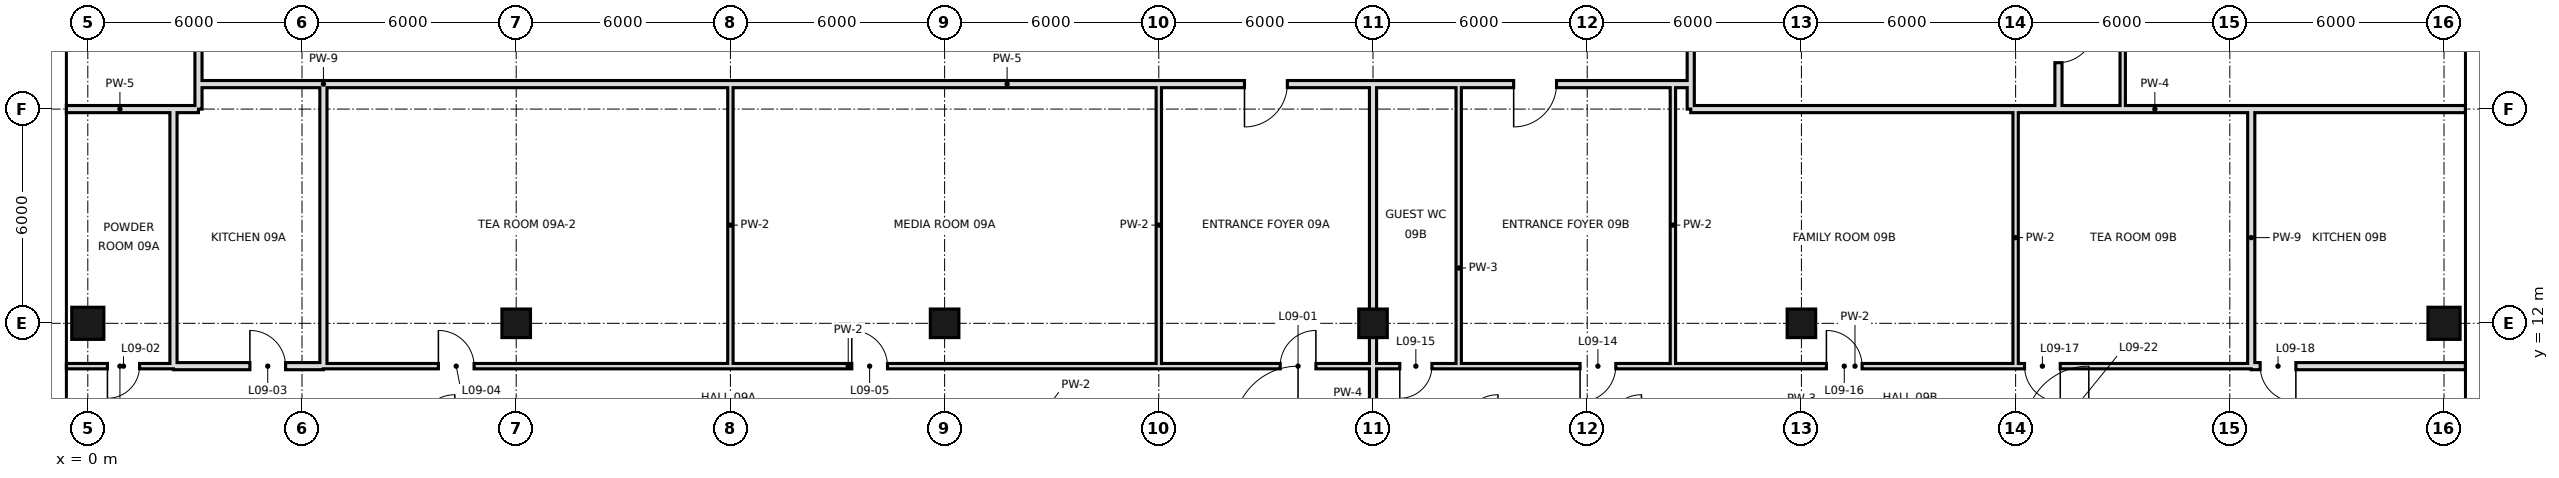
"""IFC4 building model, lengths in metres.
Left out: names, types, materials, properties, quantities, classifications, styles, units other than length and angle.
Written with IfcOpenShell. Run it as: python <this file> out.ifc"""

import sys

from ifc_helpers import new_model, si_unit, direction, frame, frame_2d, origin, origin_2d, place, context, subcontext, project, spatial, rectangle, hollow_rectangle, extrude, element, fill, save


model = new_model("IFC4")
c1 = context("Model", 3, precision=1e-05, world=origin(), true_north=direction((0.0, 1.0)))
c2 = subcontext(c1, "Body", "Model", "MODEL_VIEW")
j1 = project(units=[si_unit("LENGTHUNIT", "METRE"), si_unit("PLANEANGLEUNIT", "RADIAN")], contexts=[c1])
p1 = place(None, origin())
s1 = spatial("IfcSite", under=j1, at=p1, CompositionType="ELEMENT")
p2 = place(p1, origin())
s2 = spatial("IfcBuilding", under=s1, at=p2, CompositionType="ELEMENT")
p3 = place(p2, frame((0.0, 0.0, 53.4)))
s3 = spatial("IfcBuildingStorey", under=s2, at=p3, CompositionType="ELEMENT", Elevation=53.4)
p4 = place(p3, frame((0.0, 12.0, 0.0), z_axis=(0.0, 0.0, 1.0), x_axis=(1.0, 0.0, 0.0)))
e1 = element("IfcColumn", 1, at=p4, inside=s3, PredefinedType="COLUMN", context=c2, shape_type="SweptSolid", body=[
    extrude(hollow_rectangle(XDim=0.9, YDim=0.9, WallThickness=0.045, at=origin_2d()), origin(), (0.0, 0.0, 1.0), 3.6),
])
for number, where, z_axis, x_axis in (
    (2, (12.0, 12.0, 0.0), (0.0, 0.0, 1.0), (1.0, 0.0, 0.0)),
    (3, (24.0, 12.0, 0.0), (0.0, 0.0, 1.0), (1.0, 0.0, 0.0)),
    (4, (36.0, 12.0, 0.0), (0.0, 0.0, 1.0), (1.0, 0.0, 0.0)),
    (5, (48.0, 12.0, 0.0), (0.0, 0.0, 1.0), (1.0, 0.0, 0.0)),
):
    element("IfcColumn", number, at=place(p3, frame(where, z_axis=z_axis, x_axis=x_axis)), inside=s3, PredefinedType="COLUMN", context=c2, shape_type="SweptSolid", body=[
        extrude(hollow_rectangle(XDim=0.8, YDim=0.8, WallThickness=0.04, at=origin_2d()), origin(), (0.0, 0.0, 1.0), 3.6),
    ])
p5 = place(p3, frame((66.0, 12.0, 0.0), z_axis=(0.0, 0.0, 1.0), x_axis=(1.0, 0.0, 0.0)))
e6 = element("IfcColumn", 6, at=p5, inside=s3, PredefinedType="COLUMN", context=c2, shape_type="SweptSolid", body=[
    extrude(hollow_rectangle(XDim=0.9, YDim=0.9, WallThickness=0.045, at=origin_2d()), origin(), (0.0, 0.0, 1.0), 3.6),
])
p6 = place(p3, frame((18.0, 10.8, 0.0), z_axis=(0.0, 0.0, 1.0), x_axis=(0.0, 1.0, 0.0)))
e7 = element("IfcWall", 7, at=p6, inside=s3, PredefinedType="PARTITIONING", context=c2, shape_type="SweptSolid", body=[
    extrude(rectangle(XDim=7.9, YDim=0.15, at=frame_2d((3.95, 0.0))), origin(), (0.0, 0.0, 1.0), 2.72),
])
p7 = place(p3, frame((2.4, 10.8, 0.0), z_axis=(0.0, 0.0, 1.0), x_axis=(0.0, 1.0, 0.0)))
e8 = element("IfcWall", 8, at=p7, inside=s3, PredefinedType="SOLIDWALL", context=c2, shape_type="SweptSolid", body=[
    extrude(rectangle(XDim=7.2, YDim=0.2, at=frame_2d((3.6, 0.0))), origin(), (0.0, 0.0, 1.0), 2.72),
])
p8 = place(p3, frame((3.1, 18.7, 0.0), z_axis=(0.0, 0.0, 1.0), x_axis=(0.0, 1.0, 0.0)))
e9 = element("IfcWall", 9, at=p8, inside=s3, PredefinedType="SOLIDWALL", context=c2, shape_type="SweptSolid", body=[
    extrude(rectangle(XDim=27.249, YDim=0.2, at=frame_2d((13.625, 0.0))), origin(), (0.0, 0.0, 1.0), 2.97),
])
p9 = place(p8, frame((17.54, 0.0, 0.0)))
e10 = element("IfcOpeningElement", 10, at=p9, cuts=e9, PredefinedType="OPENING", context=c2, shape_type="SweptSolid", body=[
    extrude(rectangle(XDim=1.2, YDim=2.4, at=frame_2d((0.6, 1.2))), frame((0.0, 0.11, 0.0), z_axis=(0.0, -1.0, 0.0), x_axis=(1.0, 0.0, 0.0)), (0.0, 0.0, 1.0), 0.22),
])
p10 = place(p3, frame((3.1, 18.0, 0.0), z_axis=(0.0, 0.0, 1.0), x_axis=(0.0, 1.0, 0.0)))
e11 = element("IfcWall", 11, at=p10, inside=s3, PredefinedType="SOLIDWALL", context=c2, shape_type="SweptSolid", body=[
    extrude(rectangle(XDim=0.7, YDim=0.2, at=frame_2d((0.35, 0.0))), origin(), (0.0, 0.0, 1.0), 2.97),
])
p11 = place(p3, frame((30.0, 10.8, 0.0), z_axis=(0.0, 0.0, 1.0), x_axis=(0.0, 1.0, 0.0)))
e12 = element("IfcWall", 12, at=p11, inside=s3, PredefinedType="PARTITIONING", context=c2, shape_type="SweptSolid", body=[
    extrude(rectangle(XDim=7.9, YDim=0.15, at=frame_2d((3.95, 0.0))), origin(), (0.0, 0.0, 1.0), 2.72),
])
p12 = place(p3, frame((36.0, 0.0, 0.0), z_axis=(0.0, 0.0, 1.0), x_axis=(0.0, 1.0, 0.0)))
e13 = element("IfcWall", 13, at=p12, inside=s3, PredefinedType="SOLIDWALL", context=c2, shape_type="SweptSolid", body=[
    extrude(rectangle(XDim=18.7, YDim=0.2, at=frame_2d((9.35, 0.0))), origin(), (0.0, 0.0, 1.0), 2.72),
])
for number, where, z_axis, x_axis in (
    (14, (38.4, 10.8, 0.0), (0.0, 0.0, 1.0), (0.0, 1.0, 0.0)),
    (15, (44.4, 10.8, 0.0), (0.0, 0.0, 1.0), (0.0, 1.0, 0.0)),
):
    element("IfcWall", number, at=place(p3, frame(where, z_axis=z_axis, x_axis=x_axis)), inside=s3, PredefinedType="PARTITIONING", context=c2, shape_type="SweptSolid", body=[
        extrude(rectangle(XDim=7.9, YDim=0.15, at=frame_2d((3.95, 0.0))), origin(), (0.0, 0.0, 1.0), 3.42),
    ])
p13 = place(p3, frame((44.9, 18.0, 0.0), z_axis=(0.0, 0.0, 1.0), x_axis=(0.0, 1.0, 0.0)))
e16 = element("IfcWall", 16, at=p13, inside=s3, PredefinedType="SOLIDWALL", context=c2, shape_type="SweptSolid", body=[
    extrude(rectangle(XDim=3.6, YDim=0.2, at=frame_2d((1.8, 0.0))), origin(), (0.0, 0.0, 1.0), 2.97),
])
p14 = place(p3, frame((54.0, 10.8, 0.0), z_axis=(0.0, 0.0, 1.0), x_axis=(0.0, 1.0, 0.0)))
e17 = element("IfcWall", 17, at=p14, inside=s3, PredefinedType="PARTITIONING", context=c2, shape_type="SweptSolid", body=[
    extrude(rectangle(XDim=7.2, YDim=0.15, at=frame_2d((3.6, 0.0))), origin(), (0.0, 0.0, 1.0), 3.42),
])
p15 = place(p3, frame((55.2, 18.0, 0.0), z_axis=(0.0, 0.0, 1.0), x_axis=(0.0, 1.0, 0.0)))
e18 = element("IfcWall", 18, at=p15, inside=s3, PredefinedType="SOLIDWALL", context=c2, shape_type="SweptSolid", body=[
    extrude(rectangle(XDim=3.6, YDim=0.2, at=frame_2d((1.8, 0.0))), origin(), (0.0, 0.0, 1.0), 2.52),
])
p16 = place(p15, frame((1.3, 0.0, 0.0)))
e19 = element("IfcOpeningElement", 19, at=p16, cuts=e18, PredefinedType="OPENING", context=c2, shape_type="SweptSolid", body=[
    extrude(rectangle(XDim=1.0, YDim=2.4, at=frame_2d((0.5, 1.2))), frame((0.0, 0.11, 0.0), z_axis=(0.0, -1.0, 0.0), x_axis=(1.0, 0.0, 0.0)), (0.0, 0.0, 1.0), 0.22),
])
p17 = place(p3, frame((57.0, 18.0, 0.0), z_axis=(0.0, 0.0, 1.0), x_axis=(0.0, 1.0, 0.0)))
e20 = element("IfcWall", 20, at=p17, inside=s3, PredefinedType="PARTITIONING", context=c2, shape_type="SweptSolid", body=[
    extrude(rectangle(XDim=6.0, YDim=0.15, at=frame_2d((3.0, 0.0))), origin(), (0.0, 0.0, 1.0), 3.42),
])
p18 = place(p17, frame((3.4, 0.0, 0.0)))
e21 = element("IfcOpeningElement", 21, at=p18, cuts=e20, PredefinedType="OPENING", context=c2, shape_type="SweptSolid", body=[
    extrude(rectangle(XDim=1.0, YDim=2.4, at=frame_2d((0.5, 1.2))), frame((0.0, 0.085, 0.0), z_axis=(0.0, -1.0, 0.0), x_axis=(1.0, 0.0, 0.0)), (0.0, 0.0, 1.0), 0.17),
])
p19 = place(p3, frame((6.6, 10.8, 0.0), z_axis=(0.0, 0.0, 1.0), x_axis=(0.0, 1.0, 0.0)))
e22 = element("IfcWall", 22, at=p19, inside=s3, PredefinedType="SOLIDWALL", context=c2, shape_type="SweptSolid", body=[
    extrude(rectangle(XDim=7.9, YDim=0.2, at=frame_2d((3.95, 0.0))), origin(), (0.0, 0.0, 1.0), 2.72),
])
p20 = place(p3, frame((60.6, 10.8, 0.0), z_axis=(0.0, 0.0, 1.0), x_axis=(0.0, 1.0, 0.0)))
e23 = element("IfcWall", 23, at=p20, inside=s3, PredefinedType="SOLIDWALL", context=c2, shape_type="SweptSolid", body=[
    extrude(rectangle(XDim=7.2, YDim=0.2, at=frame_2d((3.6, 0.0))), origin(), (0.0, 0.0, 1.0), 2.52),
])
p21 = place(p3, frame((2.4, 10.8, 0.0), z_axis=(0.0, 0.0, 1.0), x_axis=(1.0, 0.0, 0.0)))
e24 = element("IfcWall", 24, at=p21, inside=s3, PredefinedType="SOLIDWALL", context=c2, shape_type="SweptSolid", body=[
    extrude(rectangle(XDim=4.2, YDim=0.2, at=frame_2d((2.1, 0.0))), origin(), (0.0, 0.0, 1.0), 2.72),
])
p22 = place(p21, frame((2.14, 0.0, 0.0)))
e25 = element("IfcOpeningElement", 25, at=p22, cuts=e24, PredefinedType="OPENING", context=c2, shape_type="SweptSolid", body=[
    extrude(rectangle(XDim=1.0, YDim=2.4, at=frame_2d((0.5, 1.2))), frame((0.0, 0.11, 0.0), z_axis=(0.0, -1.0, 0.0), x_axis=(1.0, 0.0, 0.0)), (0.0, 0.0, 1.0), 0.22),
])
p23 = place(p3, frame((60.6, 10.8, 0.0), z_axis=(0.0, 0.0, 1.0), x_axis=(1.0, 0.0, 0.0)))
e26 = element("IfcWall", 26, at=p23, inside=s3, PredefinedType="SOLIDWALL", context=c2, shape_type="SweptSolid", body=[
    extrude(rectangle(XDim=6.0, YDim=0.2, at=frame_2d((3.0, 0.0))), origin(), (0.0, 0.0, 1.0), 2.97),
])
p24 = place(p23, frame((0.25, 0.0, 0.0)))
e27 = element("IfcOpeningElement", 27, at=p24, cuts=e26, PredefinedType="OPENING", context=c2, shape_type="SweptSolid", body=[
    extrude(rectangle(XDim=1.0, YDim=2.4, at=frame_2d((0.5, 1.2))), frame((0.0, 0.11, 0.0), z_axis=(0.0, -1.0, 0.0), x_axis=(1.0, 0.0, 0.0)), (0.0, 0.0, 1.0), 0.22),
])
p25 = place(p3, frame((6.6, 10.8, 0.0), z_axis=(0.0, 0.0, 1.0), x_axis=(1.0, 0.0, 0.0)))
e28 = element("IfcWall", 28, at=p25, inside=s3, PredefinedType="PARTITIONING", context=c2, shape_type="SweptSolid", body=[
    extrude(rectangle(XDim=29.4, YDim=0.15, at=frame_2d((14.7, 0.0))), origin(), (0.0, 0.0, 1.0), 3.42),
])
p26 = place(p25, frame((26.8, 0.0, 0.0)))
e29 = element("IfcOpeningElement", 29, at=p26, cuts=e28, PredefinedType="OPENING", context=c2, shape_type="SweptSolid", body=[
    extrude(rectangle(XDim=1.0, YDim=2.4, at=frame_2d((0.5, 1.2))), frame((0.0, 0.085, 0.0), z_axis=(0.0, -1.0, 0.0), x_axis=(1.0, 0.0, 0.0)), (0.0, 0.0, 1.0), 0.17),
])
p27 = place(p25, frame((3.22, 0.0, 0.0)))
e30 = element("IfcOpeningElement", 30, at=p27, cuts=e28, PredefinedType="OPENING", context=c2, shape_type="SweptSolid", body=[
    extrude(rectangle(XDim=1.0, YDim=2.4, at=frame_2d((0.5, 1.2))), frame((0.0, 0.085, 0.0), z_axis=(0.0, -1.0, 0.0), x_axis=(1.0, 0.0, 0.0)), (0.0, 0.0, 1.0), 0.17),
])
p28 = place(p25, frame((14.8, 0.0, 0.0)))
e31 = element("IfcOpeningElement", 31, at=p28, cuts=e28, PredefinedType="OPENING", context=c2, shape_type="SweptSolid", body=[
    extrude(rectangle(XDim=1.0, YDim=2.4, at=frame_2d((0.5, 1.2))), frame((0.0, 0.085, 0.0), z_axis=(0.0, -1.0, 0.0), x_axis=(1.0, 0.0, 0.0)), (0.0, 0.0, 1.0), 0.17),
])
p29 = place(p3, frame((38.4, 10.8, 0.0), z_axis=(0.0, 0.0, 1.0), x_axis=(1.0, 0.0, 0.0)))
e32 = element("IfcWall", 32, at=p29, inside=s3, PredefinedType="PARTITIONING", context=c2, shape_type="SweptSolid", body=[
    extrude(rectangle(XDim=22.2, YDim=0.15, at=frame_2d((11.1, 0.0))), origin(), (0.0, 0.0, 1.0), 3.42),
])
p30 = place(p29, frame((3.4, 0.0, 0.0)))
e33 = element("IfcOpeningElement", 33, at=p30, cuts=e32, PredefinedType="OPENING", context=c2, shape_type="SweptSolid", body=[
    extrude(rectangle(XDim=1.0, YDim=2.4, at=frame_2d((0.5, 1.2))), frame((0.0, 0.085, 0.0), z_axis=(0.0, -1.0, 0.0), x_axis=(1.0, 0.0, 0.0)), (0.0, 0.0, 1.0), 0.17),
])
p31 = place(p29, frame((10.3, 0.0, 0.0)))
e34 = element("IfcOpeningElement", 34, at=p31, cuts=e32, PredefinedType="OPENING", context=c2, shape_type="SweptSolid", body=[
    extrude(rectangle(XDim=1.0, YDim=2.4, at=frame_2d((0.5, 1.2))), frame((0.0, 0.085, 0.0), z_axis=(0.0, -1.0, 0.0), x_axis=(1.0, 0.0, 0.0)), (0.0, 0.0, 1.0), 0.17),
])
p32 = place(p29, frame((15.85, 0.0, 0.0)))
e35 = element("IfcOpeningElement", 35, at=p32, cuts=e32, PredefinedType="OPENING", context=c2, shape_type="SweptSolid", body=[
    extrude(rectangle(XDim=1.0, YDim=2.4, at=frame_2d((0.5, 1.2))), frame((0.0, 0.085, 0.0), z_axis=(0.0, -1.0, 0.0), x_axis=(1.0, 0.0, 0.0)), (0.0, 0.0, 1.0), 0.17),
])
p33 = place(p3, frame((-0.6, 10.8, 0.0), z_axis=(0.0, 0.0, 1.0), x_axis=(1.0, 0.0, 0.0)))
e36 = element("IfcWall", 36, at=p33, inside=s3, PredefinedType="PARTITIONING", context=c2, shape_type="SweptSolid", body=[
    extrude(rectangle(XDim=3.0, YDim=0.15, at=frame_2d((1.5, 0.0))), origin(), (0.0, 0.0, 1.0), 3.42),
])
p34 = place(p33, frame((1.15, 0.0, 0.0)))
e37 = element("IfcOpeningElement", 37, at=p34, cuts=e36, PredefinedType="OPENING", context=c2, shape_type="SweptSolid", body=[
    extrude(rectangle(XDim=0.9, YDim=2.4, at=frame_2d((0.45, 1.2))), frame((0.0, 0.085, 0.0), z_axis=(0.0, -1.0, 0.0), x_axis=(1.0, 0.0, 0.0)), (0.0, 0.0, 1.0), 0.17),
])
p35 = place(p3, frame((36.0, 10.8, 0.0), z_axis=(0.0, 0.0, 1.0), x_axis=(1.0, 0.0, 0.0)))
e38 = element("IfcWall", 38, at=p35, inside=s3, PredefinedType="PARTITIONING", context=c2, shape_type="SweptSolid", body=[
    extrude(rectangle(XDim=2.4, YDim=0.15, at=frame_2d((1.2, 0.0))), origin(), (0.0, 0.0, 1.0), 3.42),
])
p36 = place(p35, frame((0.75, 0.0, 0.0)))
e39 = element("IfcOpeningElement", 39, at=p36, cuts=e38, PredefinedType="OPENING", context=c2, shape_type="SweptSolid", body=[
    extrude(rectangle(XDim=0.9, YDim=2.4, at=frame_2d((0.45, 1.2))), frame((0.0, 0.085, 0.0), z_axis=(0.0, -1.0, 0.0), x_axis=(1.0, 0.0, 0.0)), (0.0, 0.0, 1.0), 0.17),
])
p37 = place(p3, frame((-0.6, 18.0, 0.0), z_axis=(0.0, 0.0, 1.0), x_axis=(1.0, 0.0, 0.0)))
e40 = element("IfcWall", 40, at=p37, inside=s3, PredefinedType="SOLIDWALL", context=c2, shape_type="SweptSolid", body=[
    extrude(rectangle(XDim=3.0, YDim=0.2, at=frame_2d((1.5, 0.0))), origin(), (0.0, 0.0, 1.0), 2.72),
])
p38 = place(p3, frame((2.4, 18.0, 0.0), z_axis=(0.0, 0.0, 1.0), x_axis=(1.0, 0.0, 0.0)))
e41 = element("IfcWall", 41, at=p38, inside=s3, PredefinedType="SOLIDWALL", context=c2, shape_type="SweptSolid", body=[
    extrude(rectangle(XDim=0.7, YDim=0.2, at=frame_2d((0.35, 0.0))), origin(), (0.0, 0.0, 1.0), 2.97),
])
p39 = place(p3, frame((44.9, 18.0, 0.0), z_axis=(0.0, 0.0, 1.0), x_axis=(1.0, 0.0, 0.0)))
e42 = element("IfcWall", 42, at=p39, inside=s3, PredefinedType="SOLIDWALL", context=c2, shape_type="SweptSolid", body=[
    extrude(rectangle(XDim=10.3, YDim=0.2, at=frame_2d((5.15, 0.0))), origin(), (0.0, 0.0, 1.0), 2.52),
])
p40 = place(p3, frame((60.6, 18.0, 0.0), z_axis=(0.0, 0.0, 1.0), x_axis=(1.0, 0.0, 0.0)))
e43 = element("IfcWall", 43, at=p40, inside=s3, PredefinedType="SOLIDWALL", context=c2, shape_type="SweptSolid", body=[
    extrude(rectangle(XDim=6.0, YDim=0.2, at=frame_2d((3.0, 0.0))), origin(), (0.0, 0.0, 1.0), 2.52),
])
p41 = place(p3, frame((55.2, 18.0, 0.0), z_axis=(0.0, 0.0, 1.0), x_axis=(1.0, 0.0, 0.0)))
e44 = element("IfcWall", 44, at=p41, inside=s3, PredefinedType="SOLIDWALL", context=c2, shape_type="SweptSolid", body=[
    extrude(rectangle(XDim=5.4, YDim=0.2, at=frame_2d((2.7, 0.0))), origin(), (0.0, 0.0, 1.0), 2.52),
])
p42 = place(p3, frame((6.6, 18.7, 0.0), z_axis=(0.0, 0.0, 1.0), x_axis=(1.0, 0.0, 0.0)))
e45 = element("IfcWall", 45, at=p42, inside=s3, PredefinedType="SOLIDWALL", context=c2, shape_type="SweptSolid", body=[
    extrude(rectangle(XDim=38.3, YDim=0.2, at=frame_2d((19.15, 0.0))), origin(), (0.0, 0.0, 1.0), 2.72),
])
p43 = place(p42, frame((25.8, 0.0, 0.0)))
e46 = element("IfcOpeningElement", 46, at=p43, cuts=e45, PredefinedType="OPENING", context=c2, shape_type="SweptSolid", body=[
    extrude(rectangle(XDim=1.2, YDim=2.4, at=frame_2d((0.6, 1.2))), frame((0.0, 0.11, 0.0), z_axis=(0.0, -1.0, 0.0), x_axis=(1.0, 0.0, 0.0)), (0.0, 0.0, 1.0), 0.22),
])
p44 = place(p42, frame((33.34, 0.0, 0.0)))
e47 = element("IfcOpeningElement", 47, at=p44, cuts=e45, PredefinedType="OPENING", context=c2, shape_type="SweptSolid", body=[
    extrude(rectangle(XDim=1.2, YDim=2.4, at=frame_2d((0.6, 1.2))), frame((0.0, 0.11, 0.0), z_axis=(0.0, -1.0, 0.0), x_axis=(1.0, 0.0, 0.0)), (0.0, 0.0, 1.0), 0.22),
])
p45 = place(p3, frame((3.1, 18.7, 0.0), z_axis=(0.0, 0.0, 1.0), x_axis=(1.0, 0.0, 0.0)))
e48 = element("IfcWall", 48, at=p45, inside=s3, PredefinedType="SOLIDWALL", context=c2, shape_type="SweptSolid", body=[
    extrude(rectangle(XDim=3.5, YDim=0.2, at=frame_2d((1.75, 0.0))), origin(), (0.0, 0.0, 1.0), 2.72),
])
p46 = place(p26, frame((1.0, 0.0, 0.0), z_axis=(0.0, 0.0, 1.0), x_axis=(-1.0, 0.0, 0.0)))
e49 = element("IfcDoor", 49, at=p46, inside=s3, OperationType="SINGLE_SWING_LEFT", PredefinedType="DOOR", context=c2, shape_type="SweptSolid", body=[
    extrude(rectangle(XDim=1.0, YDim=2.4, at=frame_2d((0.5, 1.2))), frame((0.0, 0.025, 0.0), z_axis=(0.0, -1.0, 0.0), x_axis=(1.0, 0.0, 0.0)), (0.0, 0.0, 1.0), 0.05),
])
fill(e29, e49)
p47 = place(p34, frame((0.9, 0.0, 0.0), z_axis=(0.0, 0.0, 1.0), x_axis=(-1.0, 0.0, 0.0)))
e50 = element("IfcDoor", 50, at=p47, inside=s3, OperationType="SINGLE_SWING_RIGHT", PredefinedType="DOOR", context=c2, shape_type="SweptSolid", body=[
    extrude(rectangle(XDim=0.9, YDim=2.4, at=frame_2d((0.45, 1.2))), frame((0.0, 0.025, 0.0), z_axis=(0.0, -1.0, 0.0), x_axis=(1.0, 0.0, 0.0)), (0.0, 0.0, 1.0), 0.05),
])
fill(e37, e50)
p48 = place(p22, origin())
e51 = element("IfcDoor", 51, at=p48, inside=s3, OperationType="SINGLE_SWING_LEFT", PredefinedType="DOOR", context=c2, shape_type="SweptSolid", body=[
    extrude(rectangle(XDim=1.0, YDim=2.4, at=frame_2d((0.5, 1.2))), frame((0.0, 0.025, 0.0), z_axis=(0.0, -1.0, 0.0), x_axis=(1.0, 0.0, 0.0)), (0.0, 0.0, 1.0), 0.05),
])
fill(e25, e51)
p49 = place(p27, origin())
e52 = element("IfcDoor", 52, at=p49, inside=s3, OperationType="SINGLE_SWING_LEFT", PredefinedType="DOOR", context=c2, shape_type="SweptSolid", body=[
    extrude(rectangle(XDim=1.0, YDim=2.4, at=frame_2d((0.5, 1.2))), frame((0.0, 0.025, 0.0), z_axis=(0.0, -1.0, 0.0), x_axis=(1.0, 0.0, 0.0)), (0.0, 0.0, 1.0), 0.05),
])
fill(e30, e52)
p50 = place(p28, origin())
e53 = element("IfcDoor", 53, at=p50, inside=s3, OperationType="SINGLE_SWING_LEFT", PredefinedType="DOOR", context=c2, shape_type="SweptSolid", body=[
    extrude(rectangle(XDim=1.0, YDim=2.4, at=frame_2d((0.5, 1.2))), frame((0.0, 0.025, 0.0), z_axis=(0.0, -1.0, 0.0), x_axis=(1.0, 0.0, 0.0)), (0.0, 0.0, 1.0), 0.05),
])
fill(e31, e53)
p51 = place(p30, frame((1.0, 0.0, 0.0), z_axis=(0.0, 0.0, 1.0), x_axis=(-1.0, 0.0, 0.0)))
e54 = element("IfcDoor", 54, at=p51, inside=s3, OperationType="SINGLE_SWING_RIGHT", PredefinedType="DOOR", context=c2, shape_type="SweptSolid", body=[
    extrude(rectangle(XDim=1.0, YDim=2.4, at=frame_2d((0.5, 1.2))), frame((0.0, 0.025, 0.0), z_axis=(0.0, -1.0, 0.0), x_axis=(1.0, 0.0, 0.0)), (0.0, 0.0, 1.0), 0.05),
])
fill(e33, e54)
p52 = place(p36, frame((0.9, 0.0, 0.0), z_axis=(0.0, 0.0, 1.0), x_axis=(-1.0, 0.0, 0.0)))
e55 = element("IfcDoor", 55, at=p52, inside=s3, OperationType="SINGLE_SWING_RIGHT", PredefinedType="DOOR", context=c2, shape_type="SweptSolid", body=[
    extrude(rectangle(XDim=0.9, YDim=2.4, at=frame_2d((0.45, 1.2))), frame((0.0, 0.025, 0.0), z_axis=(0.0, -1.0, 0.0), x_axis=(1.0, 0.0, 0.0)), (0.0, 0.0, 1.0), 0.05),
])
fill(e39, e55)
p53 = place(p31, origin())
e56 = element("IfcDoor", 56, at=p53, inside=s3, OperationType="SINGLE_SWING_LEFT", PredefinedType="DOOR", context=c2, shape_type="SweptSolid", body=[
    extrude(rectangle(XDim=1.0, YDim=2.4, at=frame_2d((0.5, 1.2))), frame((0.0, 0.025, 0.0), z_axis=(0.0, -1.0, 0.0), x_axis=(1.0, 0.0, 0.0)), (0.0, 0.0, 1.0), 0.05),
])
fill(e34, e56)
p54 = place(p32, origin())
e57 = element("IfcDoor", 57, at=p54, inside=s3, OperationType="SINGLE_SWING_RIGHT", PredefinedType="DOOR", context=c2, shape_type="SweptSolid", body=[
    extrude(rectangle(XDim=1.0, YDim=2.4, at=frame_2d((0.5, 1.2))), frame((0.0, 0.025, 0.0), z_axis=(0.0, -1.0, 0.0), x_axis=(1.0, 0.0, 0.0)), (0.0, 0.0, 1.0), 0.05),
])
fill(e35, e57)
p55 = place(p24, origin())
e58 = element("IfcDoor", 58, at=p55, inside=s3, OperationType="SINGLE_SWING_RIGHT", PredefinedType="DOOR", context=c2, shape_type="SweptSolid", body=[
    extrude(rectangle(XDim=1.0, YDim=2.4, at=frame_2d((0.5, 1.2))), frame((0.0, 0.025, 0.0), z_axis=(0.0, -1.0, 0.0), x_axis=(1.0, 0.0, 0.0)), (0.0, 0.0, 1.0), 0.05),
])
fill(e27, e58)
p56 = place(p16, origin())
e59 = element("IfcDoor", 59, at=p56, inside=s3, OperationType="SINGLE_SWING_RIGHT", PredefinedType="DOOR", context=c2, shape_type="SweptSolid", body=[
    extrude(rectangle(XDim=1.0, YDim=2.4, at=frame_2d((0.5, 1.2))), frame((0.0, 0.025, 0.0), z_axis=(0.0, -1.0, 0.0), x_axis=(1.0, 0.0, 0.0)), (0.0, 0.0, 1.0), 0.05),
])
fill(e19, e59)
p57 = place(p43, frame((1.2, 0.0, 0.0), z_axis=(0.0, 0.0, 1.0), x_axis=(-1.0, 0.0, 0.0)))
e60 = element("IfcDoor", 60, at=p57, inside=s3, OperationType="SINGLE_SWING_RIGHT", PredefinedType="DOOR", context=c2, shape_type="SweptSolid", body=[
    extrude(rectangle(XDim=1.2, YDim=2.4, at=frame_2d((0.6, 1.2))), frame((0.0, 0.025, 0.0), z_axis=(0.0, -1.0, 0.0), x_axis=(1.0, 0.0, 0.0)), (0.0, 0.0, 1.0), 0.05),
])
fill(e46, e60)
p58 = place(p44, frame((1.2, 0.0, 0.0), z_axis=(0.0, 0.0, 1.0), x_axis=(-1.0, 0.0, 0.0)))
e61 = element("IfcDoor", 61, at=p58, inside=s3, OperationType="SINGLE_SWING_RIGHT", PredefinedType="DOOR", context=c2, shape_type="SweptSolid", body=[
    extrude(rectangle(XDim=1.2, YDim=2.4, at=frame_2d((0.6, 1.2))), frame((0.0, 0.025, 0.0), z_axis=(0.0, -1.0, 0.0), x_axis=(1.0, 0.0, 0.0)), (0.0, 0.0, 1.0), 0.05),
])
fill(e47, e61)
save(model, sys.argv[1])
